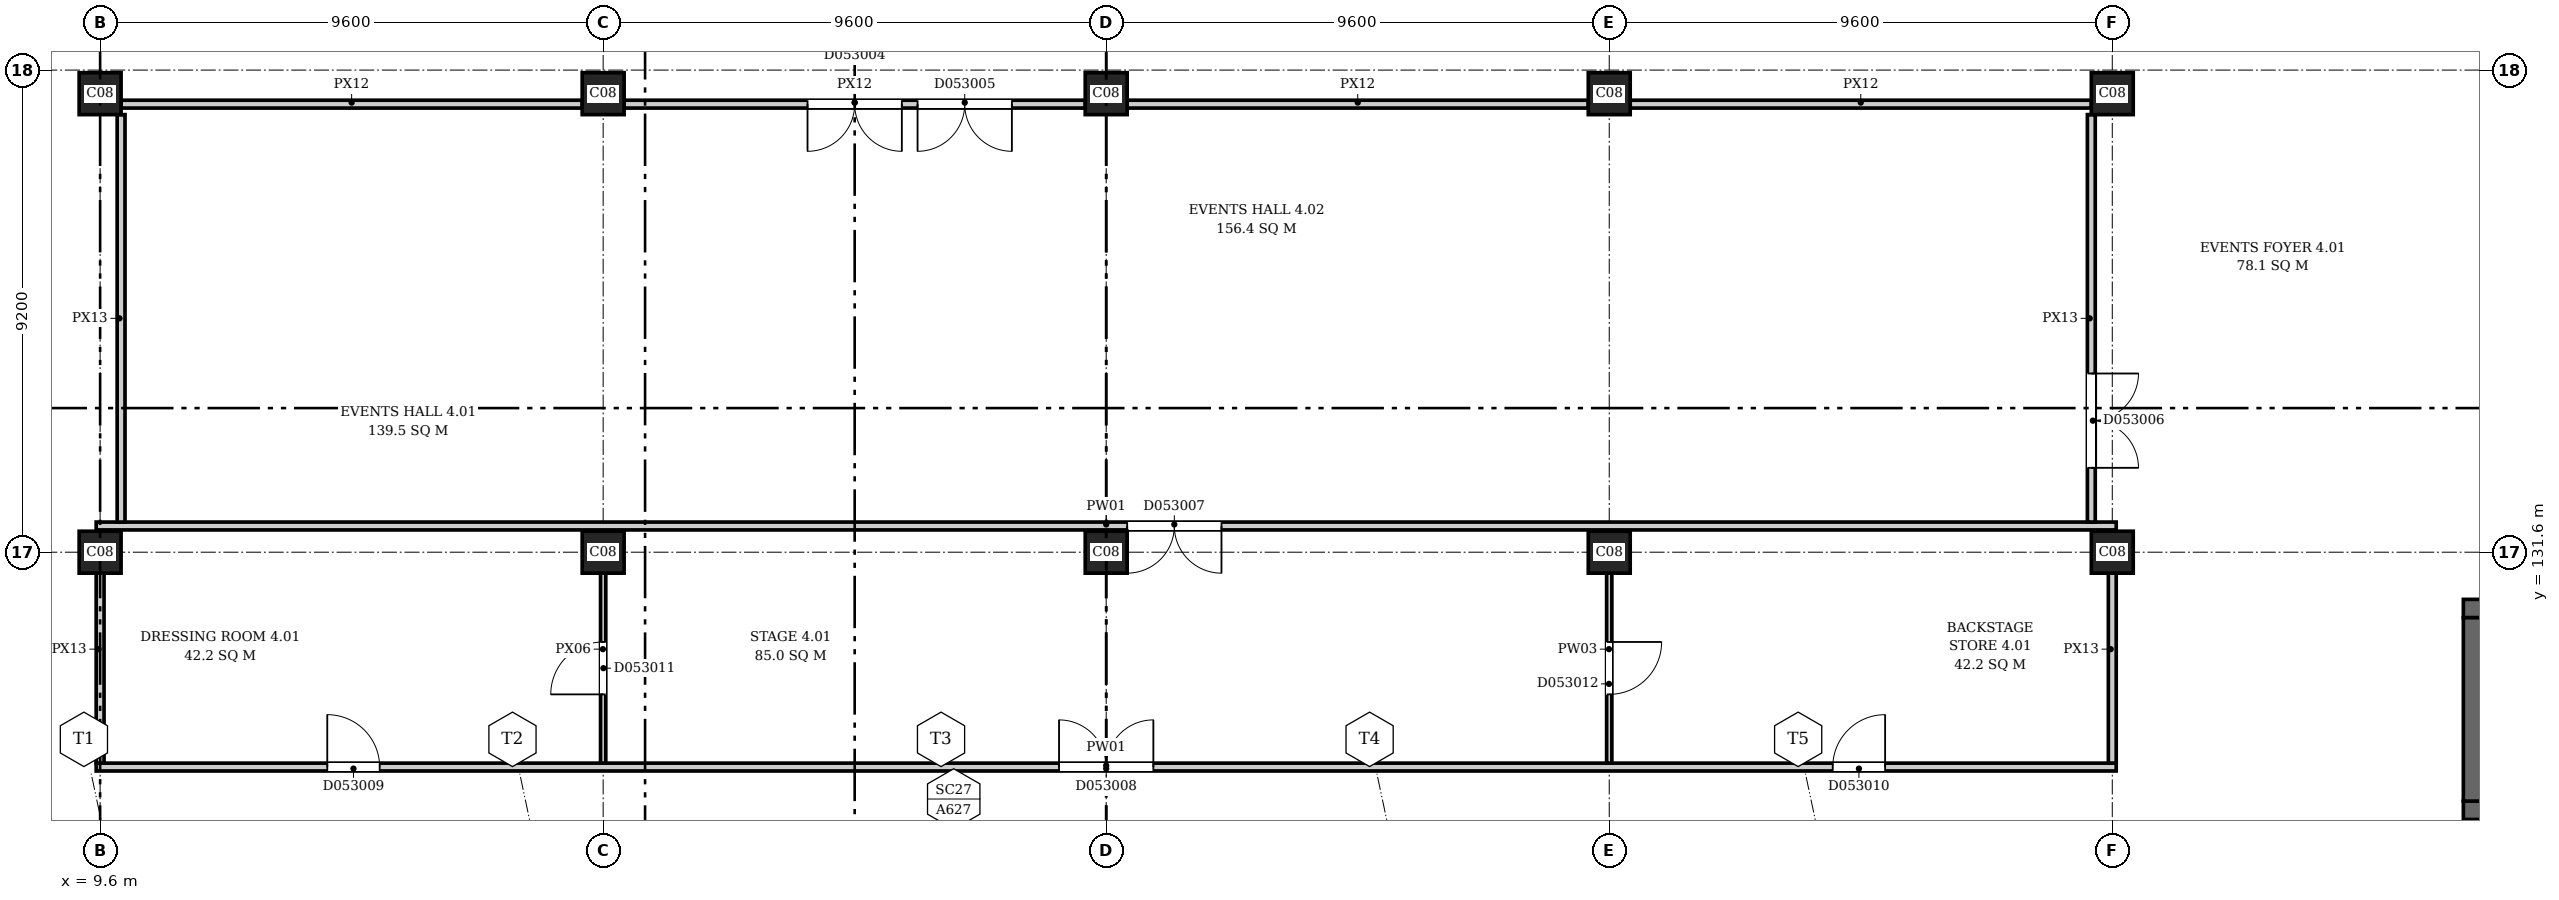
"""IFC4 building model, lengths in metres.
Left out: names, types, materials, properties, quantities, classifications, styles, units other than length and angle.
Written with IfcOpenShell. Run it as: python <this file> out.ifc"""

import sys

from ifc_helpers import new_model, si_unit, direction, frame, frame_2d, origin, origin_2d, place, context, subcontext, project, spatial, rectangle, extrude, element, fill, save


model = new_model("IFC4")
c1 = context("Model", 3, precision=1e-05, world=origin(), true_north=direction((0.0, 1.0)))
c2 = subcontext(c1, "Body", "Model", "MODEL_VIEW")
j1 = project(units=[si_unit("LENGTHUNIT", "METRE"), si_unit("PLANEANGLEUNIT", "RADIAN")], contexts=[c1])
p1 = place(None, origin())
s1 = spatial("IfcSite", under=j1, at=p1, CompositionType="ELEMENT")
p2 = place(p1, origin())
s2 = spatial("IfcBuilding", under=s1, at=p2, CompositionType="ELEMENT")
p3 = place(p2, frame((0.0, 0.0, 26.7)))
s3 = spatial("IfcBuildingStorey", under=s2, at=p3, CompositionType="ELEMENT", Elevation=26.7)
for number, where, z_axis, x_axis in (
    (1, (54.7, 126.675, 0.0), (0.0, 0.0, 1.0), (1.0, 0.0, 0.0)),
    (2, (54.7, 130.525, 0.0), (0.0, 0.0, 1.0), (1.0, 0.0, 0.0)),
):
    element("IfcWall", number, at=place(p3, frame(where, z_axis=z_axis, x_axis=x_axis)), inside=s3, PredefinedType="SHEAR", context=c2, shape_type="SweptSolid", body=[
        extrude(rectangle(XDim=2.7, YDim=0.35, at=frame_2d((1.35, 0.0))), origin(), (0.0, 0.0, 1.0), 5.2),
    ])
p4 = place(p3, frame((54.875, 126.85, 0.0), z_axis=(0.0, 0.0, 1.0), x_axis=(0.0, 1.0, 0.0)))
e3 = element("IfcWall", 3, at=p4, inside=s3, PredefinedType="SHEAR", context=c2, shape_type="SweptSolid", body=[
    extrude(rectangle(XDim=3.5, YDim=0.35, at=frame_2d((1.75, 0.0))), origin(), (0.0, 0.0, 1.0), 5.2),
])
for number, where, z_axis, x_axis in (
    (4, (9.6, 131.6, 0.0), (0.0, 0.0, 1.0), (1.0, 0.0, 0.0)),
    (5, (19.2, 131.6, 0.0), (0.0, 0.0, 1.0), (1.0, 0.0, 0.0)),
    (6, (28.8, 131.6, 0.0), (0.0, 0.0, 1.0), (1.0, 0.0, 0.0)),
    (7, (38.4, 131.6, 0.0), (0.0, 0.0, 1.0), (1.0, 0.0, 0.0)),
    (8, (48.0, 131.6, 0.0), (0.0, 0.0, 1.0), (1.0, 0.0, 0.0)),
    (9, (9.6, 140.35, 0.0), (0.0, 0.0, 1.0), (1.0, 0.0, 0.0)),
    (10, (19.2, 140.35, 0.0), (0.0, 0.0, 1.0), (1.0, 0.0, 0.0)),
    (11, (28.8, 140.35, 0.0), (0.0, 0.0, 1.0), (1.0, 0.0, 0.0)),
    (12, (38.4, 140.35, 0.0), (0.0, 0.0, 1.0), (1.0, 0.0, 0.0)),
    (13, (48.0, 140.35, 0.0), (0.0, 0.0, 1.0), (1.0, 0.0, 0.0)),
):
    element("IfcColumn", number, at=place(p3, frame(where, z_axis=z_axis, x_axis=x_axis)), inside=s3, PredefinedType="COLUMN", context=c2, shape_type="SweptSolid", body=[
        extrude(rectangle(XDim=0.8, YDim=0.8, at=origin_2d()), origin(), (0.0, 0.0, 1.0), 5.2),
    ])
p5 = place(p3, frame((9.525, 127.5, 0.0), z_axis=(0.0, 0.0, 1.0), x_axis=(1.0, 0.0, 0.0)))
e14 = element("IfcWall", 14, at=p5, inside=s3, PredefinedType="PARTITIONING", context=c2, shape_type="SweptSolid", body=[
    extrude(rectangle(XDim=38.55, YDim=0.15, at=frame_2d((19.275, 0.0))), origin(), (0.0, 0.0, 1.0), 4.85),
])
p6 = place(p5, frame((18.375, 0.0, 0.0)))
e15 = element("IfcOpeningElement", 15, at=p6, cuts=e14, PredefinedType="OPENING", context=c2, shape_type="SweptSolid", body=[
    extrude(rectangle(XDim=1.8, YDim=2.1, at=frame_2d((0.9, 1.05))), frame((0.0, 0.085, 0.0), z_axis=(0.0, -1.0, 0.0), x_axis=(1.0, 0.0, 0.0)), (0.0, 0.0, 1.0), 0.17),
])
p7 = place(p5, frame((4.41, 0.0, 0.0)))
e16 = element("IfcOpeningElement", 16, at=p7, cuts=e14, PredefinedType="OPENING", context=c2, shape_type="SweptSolid", body=[
    extrude(rectangle(XDim=1.0, YDim=2.1, at=frame_2d((0.5, 1.05))), frame((0.0, 0.085, 0.0), z_axis=(0.0, -1.0, 0.0), x_axis=(1.0, 0.0, 0.0)), (0.0, 0.0, 1.0), 0.17),
])
p8 = place(p5, frame((33.14, 0.0, 0.0)))
e17 = element("IfcOpeningElement", 17, at=p8, cuts=e14, PredefinedType="OPENING", context=c2, shape_type="SweptSolid", body=[
    extrude(rectangle(XDim=1.0, YDim=2.1, at=frame_2d((0.5, 1.05))), frame((0.0, 0.085, 0.0), z_axis=(0.0, -1.0, 0.0), x_axis=(1.0, 0.0, 0.0)), (0.0, 0.0, 1.0), 0.17),
])
p9 = place(p3, frame((9.6, 127.575, 0.0), z_axis=(0.0, 0.0, 1.0), x_axis=(0.0, 1.0, 0.0)))
e18 = element("IfcWall", 18, at=p9, inside=s3, PredefinedType="PARTITIONING", context=c2, shape_type="SweptSolid", body=[
    extrude(rectangle(XDim=3.625, YDim=0.15, at=frame_2d((1.812, 0.0))), origin(), (0.0, 0.0, 1.0), 4.45),
])
p10 = place(p3, frame((9.525, 132.1, 0.0), z_axis=(0.0, 0.0, 1.0), x_axis=(1.0, 0.0, 0.0)))
e19 = element("IfcWall", 19, at=p10, inside=s3, PredefinedType="PARTITIONING", context=c2, shape_type="SweptSolid", body=[
    extrude(rectangle(XDim=38.55, YDim=0.15, at=frame_2d((19.275, 0.0))), origin(), (0.0, 0.0, 1.0), 4.85),
])
p11 = place(p10, frame((19.675, 0.0, 0.0)))
e20 = element("IfcOpeningElement", 20, at=p11, cuts=e19, PredefinedType="OPENING", context=c2, shape_type="SweptSolid", body=[
    extrude(rectangle(XDim=1.8, YDim=2.1, at=frame_2d((0.9, 1.05))), frame((0.0, 0.085, 0.0), z_axis=(0.0, -1.0, 0.0), x_axis=(1.0, 0.0, 0.0)), (0.0, 0.0, 1.0), 0.17),
])
p12 = place(p3, frame((10.0, 132.175, 0.0), z_axis=(0.0, 0.0, 1.0), x_axis=(0.0, 1.0, 0.0)))
e21 = element("IfcWall", 21, at=p12, inside=s3, PredefinedType="PARTITIONING", context=c2, shape_type="SweptSolid", body=[
    extrude(rectangle(XDim=7.775, YDim=0.15, at=frame_2d((3.887, 0.0))), origin(), (0.0, 0.0, 1.0), 4.45),
])
p13 = place(p3, frame((10.0, 140.15, 0.0), z_axis=(0.0, 0.0, 1.0), x_axis=(1.0, 0.0, 0.0)))
e22 = element("IfcWall", 22, at=p13, inside=s3, PredefinedType="PARTITIONING", context=c2, shape_type="SweptSolid", body=[
    extrude(rectangle(XDim=8.8, YDim=0.15, at=frame_2d((4.4, 0.0))), origin(), (0.0, 0.0, 1.0), 4.25),
])
p14 = place(p3, frame((19.2, 127.575, 0.0), z_axis=(0.0, 0.0, 1.0), x_axis=(0.0, 1.0, 0.0)))
e23 = element("IfcWall", 23, at=p14, inside=s3, PredefinedType="PARTITIONING", context=c2, shape_type="SweptSolid", body=[
    extrude(rectangle(XDim=3.625, YDim=0.1, at=frame_2d((1.812, 0.0))), origin(), (0.0, 0.0, 1.0), 4.45),
])
p15 = place(p14, frame((1.312, 0.0, 0.0)))
e24 = element("IfcOpeningElement", 24, at=p15, cuts=e23, PredefinedType="OPENING", context=c2, shape_type="SweptSolid", body=[
    extrude(rectangle(XDim=1.0, YDim=2.1, at=frame_2d((0.5, 1.05))), frame((0.0, 0.06, 0.0), z_axis=(0.0, -1.0, 0.0), x_axis=(1.0, 0.0, 0.0)), (0.0, 0.0, 1.0), 0.12),
])
p16 = place(p3, frame((19.6, 140.15, 0.0), z_axis=(0.0, 0.0, 1.0), x_axis=(1.0, 0.0, 0.0)))
e25 = element("IfcWall", 25, at=p16, inside=s3, PredefinedType="PARTITIONING", context=c2, shape_type="SweptSolid", body=[
    extrude(rectangle(XDim=8.8, YDim=0.15, at=frame_2d((4.4, 0.0))), origin(), (0.0, 0.0, 1.0), 4.25),
])
p17 = place(p16, frame((3.5, 0.0, 0.0)))
e26 = element("IfcOpeningElement", 26, at=p17, cuts=e25, PredefinedType="OPENING", context=c2, shape_type="SweptSolid", body=[
    extrude(rectangle(XDim=1.8, YDim=2.1, at=frame_2d((0.9, 1.05))), frame((0.0, 0.085, 0.0), z_axis=(0.0, -1.0, 0.0), x_axis=(1.0, 0.0, 0.0)), (0.0, 0.0, 1.0), 0.17),
])
p18 = place(p16, frame((5.6, 0.0, 0.0)))
e27 = element("IfcOpeningElement", 27, at=p18, cuts=e25, PredefinedType="OPENING", context=c2, shape_type="SweptSolid", body=[
    extrude(rectangle(XDim=1.8, YDim=2.1, at=frame_2d((0.9, 1.05))), frame((0.0, 0.085, 0.0), z_axis=(0.0, -1.0, 0.0), x_axis=(1.0, 0.0, 0.0)), (0.0, 0.0, 1.0), 0.17),
])
p19 = place(p3, frame((29.2, 140.15, 0.0), z_axis=(0.0, 0.0, 1.0), x_axis=(1.0, 0.0, 0.0)))
e28 = element("IfcWall", 28, at=p19, inside=s3, PredefinedType="PARTITIONING", context=c2, shape_type="SweptSolid", body=[
    extrude(rectangle(XDim=8.8, YDim=0.15, at=frame_2d((4.4, 0.0))), origin(), (0.0, 0.0, 1.0), 4.25),
])
p20 = place(p3, frame((38.4, 127.575, 0.0), z_axis=(0.0, 0.0, 1.0), x_axis=(0.0, 1.0, 0.0)))
e29 = element("IfcWall", 29, at=p20, inside=s3, PredefinedType="PARTITIONING", context=c2, shape_type="SweptSolid", body=[
    extrude(rectangle(XDim=3.625, YDim=0.1, at=frame_2d((1.812, 0.0))), origin(), (0.0, 0.0, 1.0), 4.85),
])
p21 = place(p20, frame((1.312, 0.0, 0.0)))
e30 = element("IfcOpeningElement", 30, at=p21, cuts=e29, PredefinedType="OPENING", context=c2, shape_type="SweptSolid", body=[
    extrude(rectangle(XDim=1.0, YDim=2.1, at=frame_2d((0.5, 1.05))), frame((0.0, 0.06, 0.0), z_axis=(0.0, -1.0, 0.0), x_axis=(1.0, 0.0, 0.0)), (0.0, 0.0, 1.0), 0.12),
])
p22 = place(p3, frame((38.8, 140.15, 0.0), z_axis=(0.0, 0.0, 1.0), x_axis=(1.0, 0.0, 0.0)))
e31 = element("IfcWall", 31, at=p22, inside=s3, PredefinedType="PARTITIONING", context=c2, shape_type="SweptSolid", body=[
    extrude(rectangle(XDim=8.8, YDim=0.15, at=frame_2d((4.4, 0.0))), origin(), (0.0, 0.0, 1.0), 4.25),
])
p23 = place(p3, frame((47.6, 132.175, 0.0), z_axis=(0.0, 0.0, 1.0), x_axis=(0.0, 1.0, 0.0)))
e32 = element("IfcWall", 32, at=p23, inside=s3, PredefinedType="PARTITIONING", context=c2, shape_type="SweptSolid", body=[
    extrude(rectangle(XDim=7.775, YDim=0.15, at=frame_2d((3.887, 0.0))), origin(), (0.0, 0.0, 1.0), 4.45),
])
p24 = place(p23, frame((1.035, 0.0, 0.0)))
e33 = element("IfcOpeningElement", 33, at=p24, cuts=e32, PredefinedType="OPENING", context=c2, shape_type="SweptSolid", body=[
    extrude(rectangle(XDim=1.8, YDim=2.1, at=frame_2d((0.9, 1.05))), frame((0.0, 0.085, 0.0), z_axis=(0.0, -1.0, 0.0), x_axis=(1.0, 0.0, 0.0)), (0.0, 0.0, 1.0), 0.17),
])
p25 = place(p3, frame((48.0, 127.575, 0.0), z_axis=(0.0, 0.0, 1.0), x_axis=(0.0, 1.0, 0.0)))
e34 = element("IfcWall", 34, at=p25, inside=s3, PredefinedType="PARTITIONING", context=c2, shape_type="SweptSolid", body=[
    extrude(rectangle(XDim=3.625, YDim=0.15, at=frame_2d((1.812, 0.0))), origin(), (0.0, 0.0, 1.0), 4.45),
])
p26 = place(p17, origin())
e35 = element("IfcDoor", 35, at=p26, inside=s3, OperationType="DOUBLE_DOOR_SINGLE_SWING", PredefinedType="DOOR", context=c2, shape_type="SweptSolid", body=[
    extrude(rectangle(XDim=1.8, YDim=2.1, at=frame_2d((0.9, 1.05))), frame((0.0, 0.025, 0.0), z_axis=(0.0, -1.0, 0.0), x_axis=(1.0, 0.0, 0.0)), (0.0, 0.0, 1.0), 0.05),
])
fill(e26, e35)
p27 = place(p18, origin())
e36 = element("IfcDoor", 36, at=p27, inside=s3, OperationType="DOUBLE_DOOR_SINGLE_SWING", PredefinedType="DOOR", context=c2, shape_type="SweptSolid", body=[
    extrude(rectangle(XDim=1.8, YDim=2.1, at=frame_2d((0.9, 1.05))), frame((0.0, 0.025, 0.0), z_axis=(0.0, -1.0, 0.0), x_axis=(1.0, 0.0, 0.0)), (0.0, 0.0, 1.0), 0.05),
])
fill(e27, e36)
p28 = place(p24, origin())
e37 = element("IfcDoor", 37, at=p28, inside=s3, OperationType="DOUBLE_DOOR_SINGLE_SWING", PredefinedType="DOOR", context=c2, shape_type="SweptSolid", body=[
    extrude(rectangle(XDim=1.8, YDim=2.1, at=frame_2d((0.9, 1.05))), frame((0.0, 0.025, 0.0), z_axis=(0.0, -1.0, 0.0), x_axis=(1.0, 0.0, 0.0)), (0.0, 0.0, 1.0), 0.05),
])
fill(e33, e37)
p29 = place(p11, origin())
e38 = element("IfcDoor", 38, at=p29, inside=s3, OperationType="DOUBLE_DOOR_SINGLE_SWING", PredefinedType="DOOR", context=c2, shape_type="SweptSolid", body=[
    extrude(rectangle(XDim=1.8, YDim=2.1, at=frame_2d((0.9, 1.05))), frame((0.0, 0.025, 0.0), z_axis=(0.0, -1.0, 0.0), x_axis=(1.0, 0.0, 0.0)), (0.0, 0.0, 1.0), 0.05),
])
fill(e20, e38)
p30 = place(p6, origin())
e39 = element("IfcDoor", 39, at=p30, inside=s3, OperationType="DOUBLE_DOOR_SINGLE_SWING", PredefinedType="DOOR", context=c2, shape_type="SweptSolid", body=[
    extrude(rectangle(XDim=1.8, YDim=2.1, at=frame_2d((0.9, 1.05))), frame((0.0, 0.025, 0.0), z_axis=(0.0, -1.0, 0.0), x_axis=(1.0, 0.0, 0.0)), (0.0, 0.0, 1.0), 0.05),
])
fill(e15, e39)
p31 = place(p7, origin())
e40 = element("IfcDoor", 40, at=p31, inside=s3, OperationType="SINGLE_SWING_LEFT", PredefinedType="DOOR", context=c2, shape_type="SweptSolid", body=[
    extrude(rectangle(XDim=1.0, YDim=2.1, at=frame_2d((0.5, 1.05))), frame((0.0, 0.025, 0.0), z_axis=(0.0, -1.0, 0.0), x_axis=(1.0, 0.0, 0.0)), (0.0, 0.0, 1.0), 0.05),
])
fill(e16, e40)
p32 = place(p8, origin())
e41 = element("IfcDoor", 41, at=p32, inside=s3, OperationType="SINGLE_SWING_RIGHT", PredefinedType="DOOR", context=c2, shape_type="SweptSolid", body=[
    extrude(rectangle(XDim=1.0, YDim=2.1, at=frame_2d((0.5, 1.05))), frame((0.0, 0.025, 0.0), z_axis=(0.0, -1.0, 0.0), x_axis=(1.0, 0.0, 0.0)), (0.0, 0.0, 1.0), 0.05),
])
fill(e17, e41)
p33 = place(p15, origin())
e42 = element("IfcDoor", 42, at=p33, inside=s3, OperationType="SINGLE_SWING_LEFT", PredefinedType="DOOR", context=c2, shape_type="SweptSolid", body=[
    extrude(rectangle(XDim=1.0, YDim=2.1, at=frame_2d((0.5, 1.05))), frame((0.0, 0.025, 0.0), z_axis=(0.0, -1.0, 0.0), x_axis=(1.0, 0.0, 0.0)), (0.0, 0.0, 1.0), 0.05),
])
fill(e24, e42)
p34 = place(p21, origin())
e43 = element("IfcDoor", 43, at=p34, inside=s3, OperationType="SINGLE_SWING_RIGHT", PredefinedType="DOOR", context=c2, shape_type="SweptSolid", body=[
    extrude(rectangle(XDim=1.0, YDim=2.1, at=frame_2d((0.5, 1.05))), frame((0.0, 0.025, 0.0), z_axis=(0.0, -1.0, 0.0), x_axis=(1.0, 0.0, 0.0)), (0.0, 0.0, 1.0), 0.05),
])
fill(e30, e43)
save(model, sys.argv[1])
